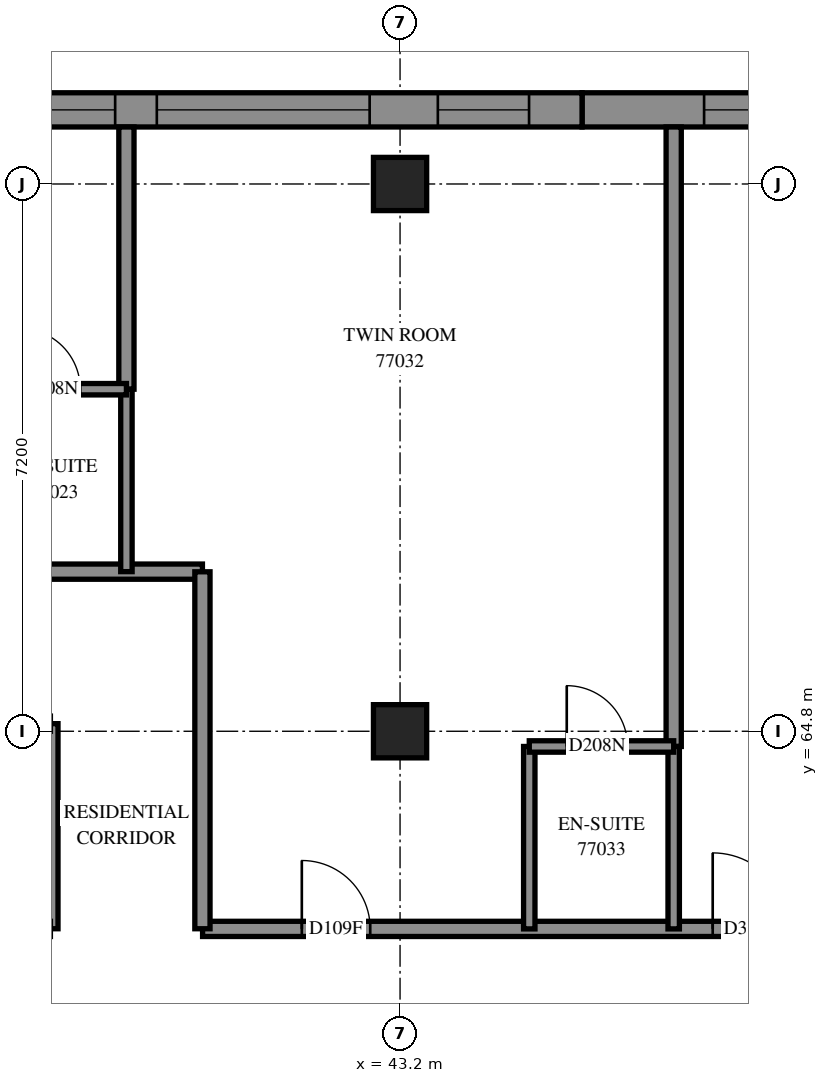
"""IFC4 building model, lengths in metres.
Left out: names, types, materials, properties, quantities, classifications, styles, units other than length and angle.
Written with IfcOpenShell. Run it as: python <this file> out.ifc"""

import sys

from ifc_helpers import new_model, si_unit, direction, frame, frame_2d, origin, origin_2d, place, context, subcontext, project, spatial, polyline, rectangle, outline, extrude, element, fill, save


model = new_model("IFC4")
c1 = context("Model", 3, precision=1e-05, world=origin(), true_north=direction((0.0, 1.0)))
c2 = subcontext(c1, "Body", "Model", "MODEL_VIEW")
j1 = project(units=[si_unit("LENGTHUNIT", "METRE"), si_unit("PLANEANGLEUNIT", "RADIAN")], contexts=[c1])
p1 = place(None, origin())
s1 = spatial("IfcSite", under=j1, at=p1, CompositionType="ELEMENT")
p2 = place(p1, origin())
s2 = spatial("IfcBuilding", under=s1, at=p2, CompositionType="ELEMENT")
p3 = place(p2, frame((0.0, 0.0, 281.2)))
s3 = spatial("IfcBuildingStorey", under=s2, at=p3, CompositionType="ELEMENT", Elevation=281.2)
for number, where, z_axis, x_axis in (
    (1, (43.2, 64.8, 0.0), (0.0, 0.0, 1.0), (1.0, 0.0, 0.0)),
    (2, (43.2, 72.0, 0.0), (0.0, 0.0, 1.0), (1.0, 0.0, 0.0)),
):
    element("IfcColumn", number, at=place(p3, frame(where, z_axis=z_axis, x_axis=x_axis)), inside=s3, PredefinedType="COLUMN", context=c2, shape_type="SweptSolid", body=[
        extrude(rectangle(XDim=0.7, YDim=0.7, at=origin_2d()), origin(), (0.0, 0.0, 1.0), 3.1),
    ])
p4 = place(p3, frame((53.304, 72.975, 0.0), z_axis=(0.0, 0.0, 1.0), x_axis=(-1.0, 0.0, 0.0)))
e3 = element("IfcWall", 3, at=p4, inside=s3, PredefinedType="SOLIDWALL", context=c2, shape_type="SweptSolid", body=[
    extrude(outline(polyline([(0.018, -0.225), (7.709, -0.225), (7.709, 0.225), (-0.018, 0.225), (0.018, -0.225)])), origin(), (0.0, 0.0, 1.0), 3.1),
])
p5 = place(p4, frame((3.304, 0.0, 0.45)))
e4 = element("IfcOpeningElement", 4, at=p5, cuts=e3, PredefinedType="OPENING", context=c2, shape_type="SweptSolid", body=[
    extrude(rectangle(XDim=2.8, YDim=2.55, at=frame_2d((1.4, 1.275))), frame((0.0, 0.235, 0.0), z_axis=(0.0, -1.0, 0.0), x_axis=(1.0, 0.0, 0.0)), (0.0, 0.0, 1.0), 0.47),
])
p6 = place(p4, frame((0.952, 0.0, 0.45)))
e5 = element("IfcOpeningElement", 5, at=p6, cuts=e3, PredefinedType="OPENING", context=c2, shape_type="SweptSolid", body=[
    extrude(rectangle(XDim=1.2, YDim=2.55, at=frame_2d((0.6, 1.275))), frame((0.0, 0.235, 0.0), z_axis=(0.0, -1.0, 0.0), x_axis=(1.0, 0.0, 0.0)), (0.0, 0.0, 1.0), 0.47),
])
p7 = place(p3, frame((45.594, 72.975, 0.0), z_axis=(0.0, 0.0, 1.0), x_axis=(-1.0, 0.0, 0.0)))
e6 = element("IfcWall", 6, at=p7, inside=s3, PredefinedType="SOLIDWALL", context=c2, shape_type="SweptSolid", body=[
    extrude(outline(polyline([(0.0, -0.225), (7.691, -0.225), (7.691, 0.225), (0.0, 0.225), (0.0, -0.225)])), origin(), (0.0, 0.0, 1.0), 3.1),
])
p8 = place(p7, frame((2.794, 0.0, 0.45)))
e7 = element("IfcOpeningElement", 7, at=p8, cuts=e6, PredefinedType="OPENING", context=c2, shape_type="SweptSolid", body=[
    extrude(rectangle(XDim=2.8, YDim=2.55, at=frame_2d((1.4, 1.275))), frame((0.0, 0.235, 0.0), z_axis=(0.0, -1.0, 0.0), x_axis=(1.0, 0.0, 0.0)), (0.0, 0.0, 1.0), 0.47),
])
p9 = place(p7, frame((0.697, 0.0, 0.45)))
e8 = element("IfcOpeningElement", 8, at=p9, cuts=e6, PredefinedType="OPENING", context=c2, shape_type="SweptSolid", body=[
    extrude(rectangle(XDim=1.2, YDim=2.55, at=frame_2d((0.6, 1.275))), frame((0.0, 0.235, 0.0), z_axis=(0.0, -1.0, 0.0), x_axis=(1.0, 0.0, 0.0)), (0.0, 0.0, 1.0), 0.47),
])
p10 = place(p7, frame((6.143, 0.0, 0.45)))
e9 = element("IfcOpeningElement", 9, at=p10, cuts=e6, PredefinedType="OPENING", context=c2, shape_type="SweptSolid", body=[
    extrude(rectangle(XDim=1.2, YDim=2.55, at=frame_2d((0.6, 1.275))), frame((0.0, 0.235, 0.0), z_axis=(0.0, -1.0, 0.0), x_axis=(1.0, 0.0, 0.0)), (0.0, 0.0, 1.0), 0.47),
])
p11 = place(p3, frame((28.8, 66.9, 0.0), z_axis=(0.0, 0.0, 1.0), x_axis=(1.0, 0.0, 0.0)))
e10 = element("IfcWall", 10, at=p11, inside=s3, PredefinedType="PARTITIONING", context=c2, shape_type="SweptSolid", body=[
    extrude(rectangle(XDim=11.8, YDim=0.2, at=frame_2d((5.9, 0.0))), origin(), (0.0, 0.0, 1.0), 3.1),
])
p12 = place(p11, frame((2.075, 0.0, 0.0)))
e11 = element("IfcOpeningElement", 11, at=p12, cuts=e10, PredefinedType="OPENING", context=c2, shape_type="SweptSolid", body=[
    extrude(rectangle(XDim=1.0, YDim=2.1, at=frame_2d((0.5, 1.05))), frame((0.0, 0.11, 0.0), z_axis=(0.0, -1.0, 0.0), x_axis=(1.0, 0.0, 0.0)), (0.0, 0.0, 1.0), 0.22),
])
p13 = place(p11, frame((5.857, 0.0, 0.0)))
e12 = element("IfcOpeningElement", 12, at=p13, cuts=e10, PredefinedType="OPENING", context=c2, shape_type="SweptSolid", body=[
    extrude(rectangle(XDim=0.9, YDim=2.1, at=frame_2d((0.45, 1.05))), frame((0.0, 0.11, 0.0), z_axis=(0.0, -1.0, 0.0), x_axis=(1.0, 0.0, 0.0)), (0.0, 0.0, 1.0), 0.22),
])
p14 = place(p3, frame((40.602, 62.2, 0.0), z_axis=(0.0, 0.0, 1.0), x_axis=(1.0, 0.0, 0.0)))
e13 = element("IfcWall", 13, at=p14, inside=s3, PredefinedType="PARTITIONING", context=c2, shape_type="SweptSolid", body=[
    extrude(rectangle(XDim=9.798, YDim=0.2, at=frame_2d((4.899, 0.0))), origin(), (0.0, 0.0, 1.0), 3.1),
])
p15 = place(p14, frame((1.306, 0.0, 0.0)))
e14 = element("IfcOpeningElement", 14, at=p15, cuts=e13, PredefinedType="OPENING", context=c2, shape_type="SweptSolid", body=[
    extrude(rectangle(XDim=0.9, YDim=2.1, at=frame_2d((0.45, 1.05))), frame((0.0, 0.11, 0.0), z_axis=(0.0, -1.0, 0.0), x_axis=(1.0, 0.0, 0.0)), (0.0, 0.0, 1.0), 0.22),
])
p16 = place(p14, frame((6.711, 0.0, 0.0)))
e15 = element("IfcOpeningElement", 15, at=p16, cuts=e13, PredefinedType="OPENING", context=c2, shape_type="SweptSolid", body=[
    extrude(rectangle(XDim=1.0, YDim=2.1, at=frame_2d((0.5, 1.05))), frame((0.0, 0.11, 0.0), z_axis=(0.0, -1.0, 0.0), x_axis=(1.0, 0.0, 0.0)), (0.0, 0.0, 1.0), 0.22),
])
p17 = place(p3, frame((46.8, 64.6, 0.0), z_axis=(0.0, 0.0, 1.0), x_axis=(0.0, 1.0, 0.0)))
e16 = element("IfcWall", 16, at=p17, inside=s3, PredefinedType="PARTITIONING", context=c2, shape_type="SweptSolid", body=[
    extrude(rectangle(XDim=8.15, YDim=0.2, at=frame_2d((4.075, 0.0))), origin(), (0.0, 0.0, 1.0), 3.1),
])
p18 = place(p3, frame((40.6, 62.202, 0.0), z_axis=(0.0, 0.0, 1.0), x_axis=(0.0, 1.0, 0.0)))
e17 = element("IfcWall", 17, at=p18, inside=s3, PredefinedType="PARTITIONING", context=c2, shape_type="SweptSolid", body=[
    extrude(rectangle(XDim=4.696, YDim=0.2, at=frame_2d((2.348, 0.0))), origin(), (0.0, 0.0, 1.0), 3.1),
])
p19 = place(p3, frame((39.6, 69.3, 0.0), z_axis=(0.0, 0.0, 1.0), x_axis=(0.0, 1.0, 0.0)))
e18 = element("IfcWall", 18, at=p19, inside=s3, PredefinedType="PARTITIONING", context=c2, shape_type="SweptSolid", body=[
    extrude(rectangle(XDim=3.45, YDim=0.2, at=frame_2d((1.725, 0.0))), origin(), (0.0, 0.0, 1.0), 3.1),
])
p20 = place(p3, frame((38.6, 62.202, 0.0), z_axis=(0.0, 0.0, 1.0), x_axis=(0.0, 1.0, 0.0)))
e19 = element("IfcWall", 19, at=p20, inside=s3, PredefinedType="PARTITIONING", context=c2, shape_type="SweptSolid", body=[
    extrude(rectangle(XDim=2.698, YDim=0.2, at=frame_2d((1.349, 0.0))), origin(), (0.0, 0.0, 1.0), 3.1),
])
for number, where, z_axis, x_axis in (
    (20, (39.6, 66.9, 0.0), (0.0, 0.0, 1.0), (0.0, 1.0, 0.0)),
    (21, (44.9, 62.2, 0.0), (0.0, 0.0, 1.0), (0.0, 1.0, 0.0)),
    (22, (46.8, 62.2, 0.0), (0.0, 0.0, 1.0), (0.0, 1.0, 0.0)),
):
    element("IfcWall", number, at=place(p3, frame(where, z_axis=z_axis, x_axis=x_axis)), inside=s3, PredefinedType="PARTITIONING", context=c2, shape_type="SweptSolid", body=[
        extrude(rectangle(XDim=2.4, YDim=0.15, at=frame_2d((1.2, 0.0))), origin(), (0.0, 0.0, 1.0), 3.1),
    ])
p21 = place(p3, frame((37.7, 69.3, 0.0), z_axis=(0.0, 0.0, 1.0), x_axis=(1.0, 0.0, 0.0)))
e23 = element("IfcWall", 23, at=p21, inside=s3, PredefinedType="PARTITIONING", context=c2, shape_type="SweptSolid", body=[
    extrude(rectangle(XDim=1.9, YDim=0.15, at=frame_2d((0.95, 0.0))), origin(), (0.0, 0.0, 1.0), 3.1),
])
p22 = place(p21, frame((0.493, 0.0, 0.0)))
e24 = element("IfcOpeningElement", 24, at=p22, cuts=e23, PredefinedType="OPENING", context=c2, shape_type="SweptSolid", body=[
    extrude(rectangle(XDim=0.8, YDim=2.1, at=frame_2d((0.4, 1.05))), frame((0.0, 0.085, 0.0), z_axis=(0.0, -1.0, 0.0), x_axis=(1.0, 0.0, 0.0)), (0.0, 0.0, 1.0), 0.17),
])
p23 = place(p3, frame((44.9, 64.6, 0.0), z_axis=(0.0, 0.0, 1.0), x_axis=(1.0, 0.0, 0.0)))
e25 = element("IfcWall", 25, at=p23, inside=s3, PredefinedType="PARTITIONING", context=c2, shape_type="SweptSolid", body=[
    extrude(rectangle(XDim=1.9, YDim=0.15, at=frame_2d((0.95, 0.0))), origin(), (0.0, 0.0, 1.0), 3.1),
])
p24 = place(p23, frame((0.493, 0.0, 0.0)))
e26 = element("IfcOpeningElement", 26, at=p24, cuts=e25, PredefinedType="OPENING", context=c2, shape_type="SweptSolid", body=[
    extrude(rectangle(XDim=0.8, YDim=2.1, at=frame_2d((0.4, 1.05))), frame((0.0, 0.085, 0.0), z_axis=(0.0, -1.0, 0.0), x_axis=(1.0, 0.0, 0.0)), (0.0, 0.0, 1.0), 0.17),
])
p25 = place(p5, origin())
e27 = element("IfcWindow", 27, at=p25, inside=s3, PartitioningType="SINGLE_PANEL", PredefinedType="WINDOW", context=c2, shape_type="SweptSolid", body=[
    extrude(rectangle(XDim=2.8, YDim=2.55, at=frame_2d((1.4, 1.275))), frame((0.0, 0.205, 0.0), z_axis=(0.0, -1.0, 0.0), x_axis=(1.0, 0.0, 0.0)), (0.0, 0.0, 1.0), 0.06),
])
fill(e4, e27)
p26 = place(p8, origin())
e28 = element("IfcWindow", 28, at=p26, inside=s3, PartitioningType="SINGLE_PANEL", PredefinedType="WINDOW", context=c2, shape_type="SweptSolid", body=[
    extrude(rectangle(XDim=2.8, YDim=2.55, at=frame_2d((1.4, 1.275))), frame((0.0, 0.205, 0.0), z_axis=(0.0, -1.0, 0.0), x_axis=(1.0, 0.0, 0.0)), (0.0, 0.0, 1.0), 0.06),
])
fill(e7, e28)
p27 = place(p9, origin())
e29 = element("IfcWindow", 29, at=p27, inside=s3, PartitioningType="SINGLE_PANEL", PredefinedType="WINDOW", context=c2, shape_type="SweptSolid", body=[
    extrude(rectangle(XDim=1.2, YDim=2.55, at=frame_2d((0.6, 1.275))), frame((0.0, 0.205, 0.0), z_axis=(0.0, -1.0, 0.0), x_axis=(1.0, 0.0, 0.0)), (0.0, 0.0, 1.0), 0.06),
])
fill(e8, e29)
p28 = place(p10, origin())
e30 = element("IfcWindow", 30, at=p28, inside=s3, PartitioningType="SINGLE_PANEL", PredefinedType="WINDOW", context=c2, shape_type="SweptSolid", body=[
    extrude(rectangle(XDim=1.2, YDim=2.55, at=frame_2d((0.6, 1.275))), frame((0.0, 0.205, 0.0), z_axis=(0.0, -1.0, 0.0), x_axis=(1.0, 0.0, 0.0)), (0.0, 0.0, 1.0), 0.06),
])
fill(e9, e30)
p29 = place(p22, origin())
e31 = element("IfcDoor", 31, at=p29, inside=s3, OperationType="SINGLE_SWING_RIGHT", PredefinedType="DOOR", context=c2, shape_type="SweptSolid", body=[
    extrude(rectangle(XDim=0.8, YDim=2.1, at=frame_2d((0.4, 1.05))), frame((0.0, 0.025, 0.0), z_axis=(0.0, -1.0, 0.0), x_axis=(1.0, 0.0, 0.0)), (0.0, 0.0, 1.0), 0.05),
])
fill(e24, e31)
p30 = place(p15, origin())
e32 = element("IfcDoor", 32, at=p30, inside=s3, OperationType="SINGLE_SWING_LEFT", PredefinedType="DOOR", context=c2, shape_type="SweptSolid", body=[
    extrude(rectangle(XDim=0.9, YDim=2.1, at=frame_2d((0.45, 1.05))), frame((0.0, 0.025, 0.0), z_axis=(0.0, -1.0, 0.0), x_axis=(1.0, 0.0, 0.0)), (0.0, 0.0, 1.0), 0.05),
])
fill(e14, e32)
p31 = place(p24, origin())
e33 = element("IfcDoor", 33, at=p31, inside=s3, OperationType="SINGLE_SWING_RIGHT", PredefinedType="DOOR", context=c2, shape_type="SweptSolid", body=[
    extrude(rectangle(XDim=0.8, YDim=2.1, at=frame_2d((0.4, 1.05))), frame((0.0, 0.025, 0.0), z_axis=(0.0, -1.0, 0.0), x_axis=(1.0, 0.0, 0.0)), (0.0, 0.0, 1.0), 0.05),
])
fill(e26, e33)
p32 = place(p16, origin())
e34 = element("IfcDoor", 34, at=p32, inside=s3, OperationType="SINGLE_SWING_LEFT", PredefinedType="DOOR", context=c2, shape_type="SweptSolid", body=[
    extrude(rectangle(XDim=1.0, YDim=2.1, at=frame_2d((0.5, 1.05))), frame((0.0, 0.025, 0.0), z_axis=(0.0, -1.0, 0.0), x_axis=(1.0, 0.0, 0.0)), (0.0, 0.0, 1.0), 0.05),
])
fill(e15, e34)
save(model, sys.argv[1])
